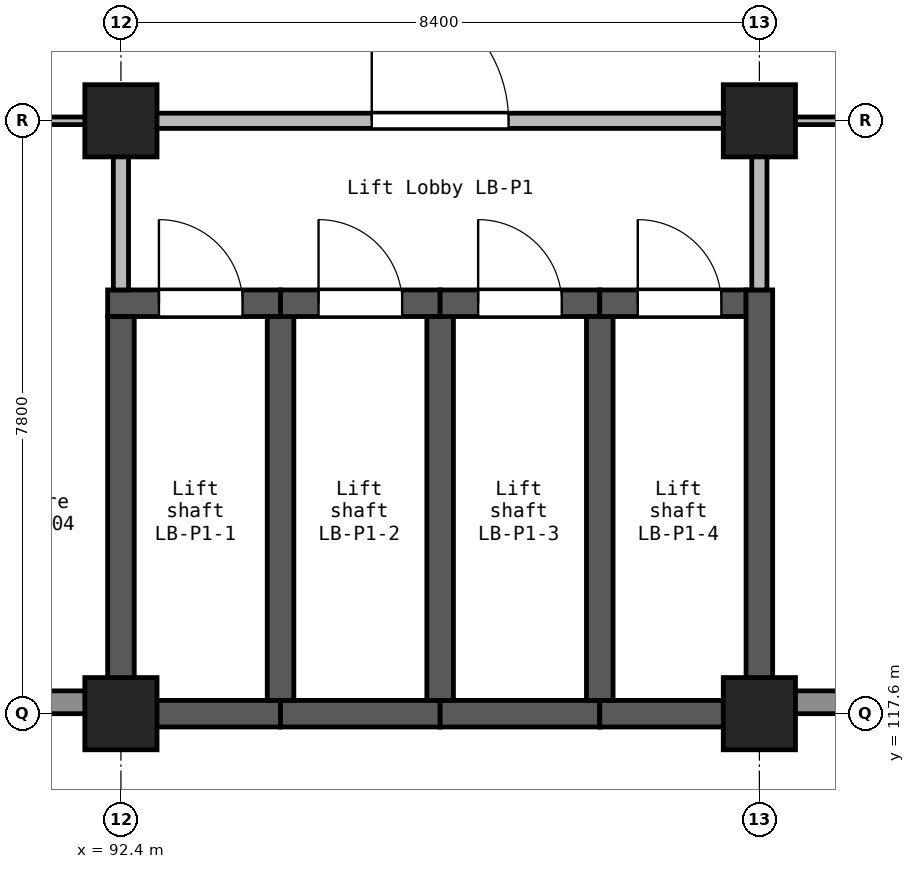
"""IFC4 building model, lengths in metres.
Left out: names, types, materials, properties, quantities, classifications, styles, units other than length and angle.
Written with IfcOpenShell. Run it as: python <this file> out.ifc"""

import sys

from ifc_helpers import new_model, si_unit, direction, frame, frame_2d, origin, origin_2d, place, context, subcontext, project, spatial, rectangle, extrude, element, fill, save


model = new_model("IFC4")
c1 = context("Model", 3, precision=1e-05, world=origin(), true_north=direction((0.0, 1.0)))
c2 = subcontext(c1, "Body", "Model", "MODEL_VIEW")
j1 = project(units=[si_unit("LENGTHUNIT", "METRE"), si_unit("PLANEANGLEUNIT", "RADIAN")], contexts=[c1])
p1 = place(None, origin())
s1 = spatial("IfcSite", under=j1, at=p1, CompositionType="ELEMENT")
p2 = place(p1, origin())
s2 = spatial("IfcBuilding", under=s1, at=p2, CompositionType="ELEMENT")
p3 = place(p2, frame((0.0, 0.0, 5.4)))
s3 = spatial("IfcBuildingStorey", under=s2, at=p3, CompositionType="ELEMENT", Elevation=5.4)
for number, where, z_axis, x_axis in (
    (1, (92.4, 117.6, 0.0), (0.0, 0.0, 1.0), (1.0, 0.0, 0.0)),
    (2, (92.4, 125.4, 0.0), (0.0, 0.0, 1.0), (1.0, 0.0, 0.0)),
    (3, (100.8, 117.6, 0.0), (0.0, 0.0, 1.0), (1.0, 0.0, 0.0)),
    (4, (100.8, 125.4, 0.0), (0.0, 0.0, 1.0), (1.0, 0.0, 0.0)),
):
    element("IfcColumn", number, at=place(p3, frame(where, z_axis=z_axis, x_axis=x_axis)), inside=s3, PredefinedType="COLUMN", context=c2, shape_type="SweptSolid", body=[
        extrude(rectangle(XDim=0.95, YDim=0.95, at=origin_2d()), origin(), (0.0, 0.0, 1.0), 4.5),
    ])
p4 = place(p3, frame((92.225, 123.0, 0.0), z_axis=(0.0, 0.0, 1.0), x_axis=(1.0, 0.0, 0.0)))
e5 = element("IfcWall", 5, at=p4, inside=s3, PredefinedType="SHEAR", context=c2, shape_type="SweptSolid", body=[
    extrude(rectangle(XDim=2.275, YDim=0.35, at=frame_2d((1.137, 0.0))), origin(), (0.0, 0.0, 1.0), 4.5),
])
p5 = place(p4, frame((0.675, 0.0, 0.0)))
e6 = element("IfcOpeningElement", 6, at=p5, cuts=e5, PredefinedType="OPENING", context=c2, shape_type="SweptSolid", body=[
    extrude(rectangle(XDim=1.1, YDim=2.1, at=frame_2d((0.55, 1.05))), frame((0.0, 0.185, 0.0), z_axis=(0.0, -1.0, 0.0), x_axis=(1.0, 0.0, 0.0)), (0.0, 0.0, 1.0), 0.37),
])
p6 = place(p3, frame((92.4, 117.425, 0.0), z_axis=(0.0, 0.0, 1.0), x_axis=(0.0, 1.0, 0.0)))
e7 = element("IfcWall", 7, at=p6, inside=s3, PredefinedType="SHEAR", context=c2, shape_type="SweptSolid", body=[
    extrude(rectangle(XDim=5.4, YDim=0.35, at=frame_2d((2.7, 0.0))), origin(), (0.0, 0.0, 1.0), 4.5),
])
p7 = place(p3, frame((92.575, 117.6, 0.0), z_axis=(0.0, 0.0, 1.0), x_axis=(1.0, 0.0, 0.0)))
e8 = element("IfcWall", 8, at=p7, inside=s3, PredefinedType="SHEAR", context=c2, shape_type="SweptSolid", body=[
    extrude(rectangle(XDim=1.925, YDim=0.35, at=frame_2d((0.962, 0.0))), origin(), (0.0, 0.0, 1.0), 4.5),
])
p8 = place(p3, frame((94.5, 117.6, 0.0), z_axis=(0.0, 0.0, 1.0), x_axis=(1.0, 0.0, 0.0)))
e9 = element("IfcWall", 9, at=p8, inside=s3, PredefinedType="SHEAR", context=c2, shape_type="SweptSolid", body=[
    extrude(rectangle(XDim=2.1, YDim=0.35, at=frame_2d((1.05, 0.0))), origin(), (0.0, 0.0, 1.0), 4.5),
])
p9 = place(p3, frame((94.5, 117.775, 0.0), z_axis=(0.0, 0.0, 1.0), x_axis=(0.0, 1.0, 0.0)))
e10 = element("IfcWall", 10, at=p9, inside=s3, PredefinedType="SHEAR", context=c2, shape_type="SweptSolid", body=[
    extrude(rectangle(XDim=5.05, YDim=0.35, at=frame_2d((2.525, 0.0))), origin(), (0.0, 0.0, 1.0), 4.5),
])
p10 = place(p3, frame((94.5, 123.0, 0.0), z_axis=(0.0, 0.0, 1.0), x_axis=(1.0, 0.0, 0.0)))
e11 = element("IfcWall", 11, at=p10, inside=s3, PredefinedType="SHEAR", context=c2, shape_type="SweptSolid", body=[
    extrude(rectangle(XDim=2.1, YDim=0.35, at=frame_2d((1.05, 0.0))), origin(), (0.0, 0.0, 1.0), 4.5),
])
p11 = place(p10, frame((0.5, 0.0, 0.0)))
e12 = element("IfcOpeningElement", 12, at=p11, cuts=e11, PredefinedType="OPENING", context=c2, shape_type="SweptSolid", body=[
    extrude(rectangle(XDim=1.1, YDim=2.1, at=frame_2d((0.55, 1.05))), frame((0.0, 0.185, 0.0), z_axis=(0.0, -1.0, 0.0), x_axis=(1.0, 0.0, 0.0)), (0.0, 0.0, 1.0), 0.37),
])
p12 = place(p3, frame((96.6, 117.6, 0.0), z_axis=(0.0, 0.0, 1.0), x_axis=(1.0, 0.0, 0.0)))
e13 = element("IfcWall", 13, at=p12, inside=s3, PredefinedType="SHEAR", context=c2, shape_type="SweptSolid", body=[
    extrude(rectangle(XDim=2.1, YDim=0.35, at=frame_2d((1.05, 0.0))), origin(), (0.0, 0.0, 1.0), 4.5),
])
p13 = place(p3, frame((96.6, 117.775, 0.0), z_axis=(0.0, 0.0, 1.0), x_axis=(0.0, 1.0, 0.0)))
e14 = element("IfcWall", 14, at=p13, inside=s3, PredefinedType="SHEAR", context=c2, shape_type="SweptSolid", body=[
    extrude(rectangle(XDim=5.05, YDim=0.35, at=frame_2d((2.525, 0.0))), origin(), (0.0, 0.0, 1.0), 4.5),
])
p14 = place(p3, frame((96.6, 123.0, 0.0), z_axis=(0.0, 0.0, 1.0), x_axis=(1.0, 0.0, 0.0)))
e15 = element("IfcWall", 15, at=p14, inside=s3, PredefinedType="SHEAR", context=c2, shape_type="SweptSolid", body=[
    extrude(rectangle(XDim=2.1, YDim=0.35, at=frame_2d((1.05, 0.0))), origin(), (0.0, 0.0, 1.0), 4.5),
])
p15 = place(p14, frame((0.5, 0.0, 0.0)))
e16 = element("IfcOpeningElement", 16, at=p15, cuts=e15, PredefinedType="OPENING", context=c2, shape_type="SweptSolid", body=[
    extrude(rectangle(XDim=1.1, YDim=2.1, at=frame_2d((0.55, 1.05))), frame((0.0, 0.185, 0.0), z_axis=(0.0, -1.0, 0.0), x_axis=(1.0, 0.0, 0.0)), (0.0, 0.0, 1.0), 0.37),
])
p16 = place(p3, frame((98.7, 117.6, 0.0), z_axis=(0.0, 0.0, 1.0), x_axis=(1.0, 0.0, 0.0)))
e17 = element("IfcWall", 17, at=p16, inside=s3, PredefinedType="SHEAR", context=c2, shape_type="SweptSolid", body=[
    extrude(rectangle(XDim=1.925, YDim=0.35, at=frame_2d((0.962, 0.0))), origin(), (0.0, 0.0, 1.0), 4.5),
])
p17 = place(p3, frame((98.7, 117.775, 0.0), z_axis=(0.0, 0.0, 1.0), x_axis=(0.0, 1.0, 0.0)))
e18 = element("IfcWall", 18, at=p17, inside=s3, PredefinedType="SHEAR", context=c2, shape_type="SweptSolid", body=[
    extrude(rectangle(XDim=5.05, YDim=0.35, at=frame_2d((2.525, 0.0))), origin(), (0.0, 0.0, 1.0), 4.5),
])
p18 = place(p3, frame((98.7, 123.0, 0.0), z_axis=(0.0, 0.0, 1.0), x_axis=(1.0, 0.0, 0.0)))
e19 = element("IfcWall", 19, at=p18, inside=s3, PredefinedType="SHEAR", context=c2, shape_type="SweptSolid", body=[
    extrude(rectangle(XDim=1.925, YDim=0.35, at=frame_2d((0.962, 0.0))), origin(), (0.0, 0.0, 1.0), 4.5),
])
p19 = place(p18, frame((0.5, 0.0, 0.0)))
e20 = element("IfcOpeningElement", 20, at=p19, cuts=e19, PredefinedType="OPENING", context=c2, shape_type="SweptSolid", body=[
    extrude(rectangle(XDim=1.1, YDim=2.1, at=frame_2d((0.55, 1.05))), frame((0.0, 0.185, 0.0), z_axis=(0.0, -1.0, 0.0), x_axis=(1.0, 0.0, 0.0)), (0.0, 0.0, 1.0), 0.37),
])
p20 = place(p3, frame((100.8, 117.425, 0.0), z_axis=(0.0, 0.0, 1.0), x_axis=(0.0, 1.0, 0.0)))
e21 = element("IfcWall", 21, at=p20, inside=s3, PredefinedType="SHEAR", context=c2, shape_type="SweptSolid", body=[
    extrude(rectangle(XDim=5.75, YDim=0.35, at=frame_2d((2.875, 0.0))), origin(), (0.0, 0.0, 1.0), 4.5),
])
p21 = place(p3, frame((84.45, 117.75, 0.0), z_axis=(0.0, 0.0, 1.0), x_axis=(1.0, 0.0, 0.0)))
e22 = element("IfcWall", 22, at=p21, inside=s3, PredefinedType="STANDARD", context=c2, shape_type="SweptSolid", body=[
    extrude(rectangle(XDim=7.5, YDim=0.3, at=frame_2d((3.75, 0.0))), origin(), (0.0, 0.0, 1.0), 3.35),
])
p22 = place(p21, frame((0.975, 0.0, 0.9)))
e23 = element("IfcOpeningElement", 23, at=p22, cuts=e22, PredefinedType="OPENING", context=c2, shape_type="SweptSolid", body=[
    extrude(rectangle(XDim=1.8, YDim=1.5, at=frame_2d((0.9, 0.75))), frame((0.0, 0.16, 0.0), z_axis=(0.0, -1.0, 0.0), x_axis=(1.0, 0.0, 0.0)), (0.0, 0.0, 1.0), 0.32),
])
p23 = place(p21, frame((4.725, 0.0, 0.9)))
e24 = element("IfcOpeningElement", 24, at=p23, cuts=e22, PredefinedType="OPENING", context=c2, shape_type="SweptSolid", body=[
    extrude(rectangle(XDim=1.8, YDim=1.5, at=frame_2d((0.9, 0.75))), frame((0.0, 0.16, 0.0), z_axis=(0.0, -1.0, 0.0), x_axis=(1.0, 0.0, 0.0)), (0.0, 0.0, 1.0), 0.32),
])
p24 = place(p3, frame((101.25, 117.75, 0.0), z_axis=(0.0, 0.0, 1.0), x_axis=(1.0, 0.0, 0.0)))
e25 = element("IfcWall", 25, at=p24, inside=s3, PredefinedType="STANDARD", context=c2, shape_type="SweptSolid", body=[
    extrude(rectangle(XDim=7.5, YDim=0.3, at=frame_2d((3.75, 0.0))), origin(), (0.0, 0.0, 1.0), 3.35),
])
p25 = place(p24, frame((0.975, 0.0, 0.9)))
e26 = element("IfcOpeningElement", 26, at=p25, cuts=e25, PredefinedType="OPENING", context=c2, shape_type="SweptSolid", body=[
    extrude(rectangle(XDim=1.8, YDim=1.5, at=frame_2d((0.9, 0.75))), frame((0.0, 0.16, 0.0), z_axis=(0.0, -1.0, 0.0), x_axis=(1.0, 0.0, 0.0)), (0.0, 0.0, 1.0), 0.32),
])
p26 = place(p24, frame((4.725, 0.0, 0.9)))
e27 = element("IfcOpeningElement", 27, at=p26, cuts=e25, PredefinedType="OPENING", context=c2, shape_type="SweptSolid", body=[
    extrude(rectangle(XDim=1.8, YDim=1.5, at=frame_2d((0.9, 0.75))), frame((0.0, 0.16, 0.0), z_axis=(0.0, -1.0, 0.0), x_axis=(1.0, 0.0, 0.0)), (0.0, 0.0, 1.0), 0.32),
])
p27 = place(p3, frame((92.85, 125.4, 0.0), z_axis=(0.0, 0.0, 1.0), x_axis=(1.0, 0.0, 0.0)))
e28 = element("IfcWall", 28, at=p27, inside=s3, PredefinedType="SOLIDWALL", context=c2, shape_type="SweptSolid", body=[
    extrude(rectangle(XDim=7.5, YDim=0.2, at=frame_2d((3.75, 0.0))), origin(), (0.0, 0.0, 1.0), 4.25),
])
p28 = place(p27, frame((2.85, 0.0, 0.0)))
e29 = element("IfcOpeningElement", 29, at=p28, cuts=e28, PredefinedType="OPENING", context=c2, shape_type="SweptSolid", body=[
    extrude(rectangle(XDim=1.8, YDim=2.1, at=frame_2d((0.9, 1.05))), frame((0.0, 0.11, 0.0), z_axis=(0.0, -1.0, 0.0), x_axis=(1.0, 0.0, 0.0)), (0.0, 0.0, 1.0), 0.22),
])
for number, where, z_axis, x_axis in (
    (30, (92.4, 123.175, 0.0), (0.0, 0.0, 1.0), (0.0, 1.0, 0.0)),
    (31, (100.8, 123.175, 0.0), (0.0, 0.0, 1.0), (0.0, 1.0, 0.0)),
):
    element("IfcWall", number, at=place(p3, frame(where, z_axis=z_axis, x_axis=x_axis)), inside=s3, PredefinedType="SOLIDWALL", context=c2, shape_type="SweptSolid", body=[
        extrude(rectangle(XDim=1.775, YDim=0.2, at=frame_2d((0.887, 0.0))), origin(), (0.0, 0.0, 1.0), 4.25),
    ])
p29 = place(p3, frame((91.95, 125.4, 0.0), z_axis=(0.0, 0.0, 1.0), x_axis=(-1.0, 0.0, 0.0)))
e32 = element("IfcWall", 32, at=p29, inside=s3, PredefinedType="PARTITIONING", context=c2, shape_type="SweptSolid", body=[
    extrude(rectangle(XDim=7.5, YDim=0.1, at=frame_2d((3.75, 0.0))), origin(), (0.0, 0.0, 1.0), 4.25),
])
p30 = place(p29, frame((4.851, 0.0, 0.0)))
e33 = element("IfcOpeningElement", 33, at=p30, cuts=e32, PredefinedType="OPENING", context=c2, shape_type="SweptSolid", body=[
    extrude(rectangle(XDim=1.4, YDim=2.1, at=frame_2d((0.7, 1.05))), frame((0.0, 0.06, 0.0), z_axis=(0.0, -1.0, 0.0), x_axis=(1.0, 0.0, 0.0)), (0.0, 0.0, 1.0), 0.12),
])
p31 = place(p29, frame((0.652, 0.0, 0.0)))
e34 = element("IfcOpeningElement", 34, at=p31, cuts=e32, PredefinedType="OPENING", context=c2, shape_type="SweptSolid", body=[
    extrude(rectangle(XDim=1.4, YDim=2.1, at=frame_2d((0.7, 1.05))), frame((0.0, 0.06, 0.0), z_axis=(0.0, -1.0, 0.0), x_axis=(1.0, 0.0, 0.0)), (0.0, 0.0, 1.0), 0.12),
])
p32 = place(p3, frame((101.25, 125.4, 0.0), z_axis=(0.0, 0.0, 1.0), x_axis=(1.0, 0.0, 0.0)))
e35 = element("IfcWall", 35, at=p32, inside=s3, PredefinedType="PARTITIONING", context=c2, shape_type="SweptSolid", body=[
    extrude(rectangle(XDim=7.5, YDim=0.1, at=frame_2d((3.75, 0.0))), origin(), (0.0, 0.0, 1.0), 4.25),
])
p33 = place(p32, frame((1.249, 0.0, 0.0)))
e36 = element("IfcOpeningElement", 36, at=p33, cuts=e35, PredefinedType="OPENING", context=c2, shape_type="SweptSolid", body=[
    extrude(rectangle(XDim=1.4, YDim=2.1, at=frame_2d((0.7, 1.05))), frame((0.0, 0.06, 0.0), z_axis=(0.0, -1.0, 0.0), x_axis=(1.0, 0.0, 0.0)), (0.0, 0.0, 1.0), 0.12),
])
p34 = place(p32, frame((5.448, 0.0, 0.0)))
e37 = element("IfcOpeningElement", 37, at=p34, cuts=e35, PredefinedType="OPENING", context=c2, shape_type="SweptSolid", body=[
    extrude(rectangle(XDim=1.4, YDim=2.1, at=frame_2d((0.7, 1.05))), frame((0.0, 0.06, 0.0), z_axis=(0.0, -1.0, 0.0), x_axis=(1.0, 0.0, 0.0)), (0.0, 0.0, 1.0), 0.12),
])
p35 = place(p5, origin())
e38 = element("IfcDoor", 38, at=p35, inside=s3, OperationType="DOUBLE_DOOR_SLIDING", PredefinedType="DOOR", context=c2, shape_type="SweptSolid", body=[
    extrude(rectangle(XDim=1.1, YDim=2.1, at=frame_2d((0.55, 1.05))), frame((0.0, 0.025, 0.0), z_axis=(0.0, -1.0, 0.0), x_axis=(1.0, 0.0, 0.0)), (0.0, 0.0, 1.0), 0.05),
])
fill(e6, e38)
p36 = place(p11, origin())
e39 = element("IfcDoor", 39, at=p36, inside=s3, OperationType="DOUBLE_DOOR_SLIDING", PredefinedType="DOOR", context=c2, shape_type="SweptSolid", body=[
    extrude(rectangle(XDim=1.1, YDim=2.1, at=frame_2d((0.55, 1.05))), frame((0.0, 0.025, 0.0), z_axis=(0.0, -1.0, 0.0), x_axis=(1.0, 0.0, 0.0)), (0.0, 0.0, 1.0), 0.05),
])
fill(e12, e39)
p37 = place(p15, origin())
e40 = element("IfcDoor", 40, at=p37, inside=s3, OperationType="DOUBLE_DOOR_SLIDING", PredefinedType="DOOR", context=c2, shape_type="SweptSolid", body=[
    extrude(rectangle(XDim=1.1, YDim=2.1, at=frame_2d((0.55, 1.05))), frame((0.0, 0.025, 0.0), z_axis=(0.0, -1.0, 0.0), x_axis=(1.0, 0.0, 0.0)), (0.0, 0.0, 1.0), 0.05),
])
fill(e16, e40)
p38 = place(p19, origin())
e41 = element("IfcDoor", 41, at=p38, inside=s3, OperationType="DOUBLE_DOOR_SLIDING", PredefinedType="DOOR", context=c2, shape_type="SweptSolid", body=[
    extrude(rectangle(XDim=1.1, YDim=2.1, at=frame_2d((0.55, 1.05))), frame((0.0, 0.025, 0.0), z_axis=(0.0, -1.0, 0.0), x_axis=(1.0, 0.0, 0.0)), (0.0, 0.0, 1.0), 0.05),
])
fill(e20, e41)
p39 = place(p28, frame((1.8, 0.0, 0.0), z_axis=(0.0, 0.0, 1.0), x_axis=(-1.0, 0.0, 0.0)))
e42 = element("IfcDoor", 42, at=p39, inside=s3, OperationType="DOUBLE_DOOR_SINGLE_SWING", PredefinedType="DOOR", context=c2, shape_type="SweptSolid", body=[
    extrude(rectangle(XDim=1.8, YDim=2.1, at=frame_2d((0.9, 1.05))), frame((0.0, 0.025, 0.0), z_axis=(0.0, -1.0, 0.0), x_axis=(1.0, 0.0, 0.0)), (0.0, 0.0, 1.0), 0.05),
])
fill(e29, e42)
save(model, sys.argv[1])
